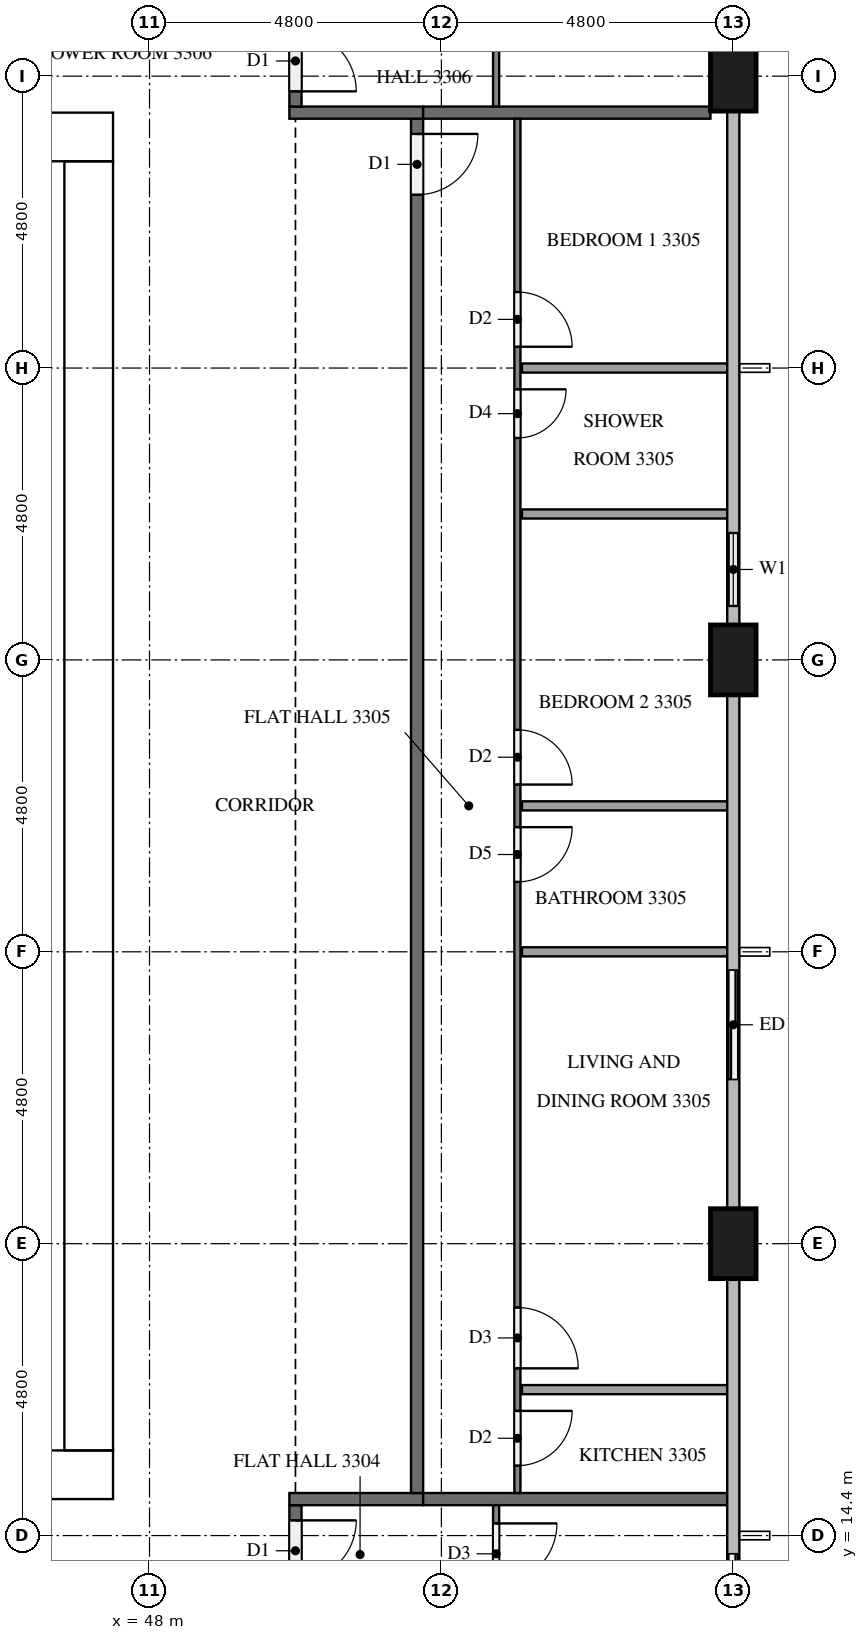
"""IFC4 building model, lengths in metres.
Left out: names, types, materials, properties, quantities, classifications, styles, units other than length and angle.
Written with IfcOpenShell. Run it as: python <this file> out.ifc"""

import sys

from ifc_helpers import new_model, si_unit, direction, frame, frame_2d, origin, origin_2d, place, context, subcontext, project, spatial, rectangle, extrude, element, fill, save


model = new_model("IFC4")
c1 = context("Model", 3, precision=1e-05, world=origin(), true_north=direction((0.0, 1.0)))
c2 = subcontext(c1, "Body", "Model", "MODEL_VIEW")
j1 = project(units=[si_unit("LENGTHUNIT", "METRE"), si_unit("PLANEANGLEUNIT", "RADIAN")], contexts=[c1])
p1 = place(None, origin())
s1 = spatial("IfcSite", under=j1, at=p1, CompositionType="ELEMENT")
p2 = place(p1, origin())
s2 = spatial("IfcBuilding", under=s1, at=p2, CompositionType="ELEMENT")
p3 = place(p2, frame((0.0, 0.0, 129.6)))
s3 = spatial("IfcBuildingStorey", under=s2, at=p3, CompositionType="ELEMENT", Elevation=129.6)
p4 = place(p3, frame((15.0, 15.4, 0.0), z_axis=(0.0, 0.0, 1.0), x_axis=(1.0, 0.0, 0.0)))
e1 = element("IfcWall", 1, at=p4, inside=s3, PredefinedType="SHEAR", context=c2, shape_type="SweptSolid", body=[
    extrude(rectangle(XDim=32.4, YDim=0.8, at=frame_2d((16.2, 0.0))), origin(), (0.0, 0.0, 1.0), 3.2),
])
p5 = place(p4, frame((15.3, 0.0, 0.0)))
e2 = element("IfcOpeningElement", 2, at=p5, cuts=e1, PredefinedType="OPENING", context=c2, shape_type="SweptSolid", body=[
    extrude(rectangle(XDim=1.8, YDim=2.1, at=frame_2d((0.9, 1.05))), frame((0.0, 0.41, 0.0), z_axis=(0.0, -1.0, 0.0), x_axis=(1.0, 0.0, 0.0)), (0.0, 0.0, 1.0), 0.82),
])
p6 = place(p3, frame((15.0, 37.4, 0.0), z_axis=(0.0, 0.0, 1.0), x_axis=(1.0, 0.0, 0.0)))
e3 = element("IfcWall", 3, at=p6, inside=s3, PredefinedType="SHEAR", context=c2, shape_type="SweptSolid", body=[
    extrude(rectangle(XDim=32.4, YDim=0.8, at=frame_2d((16.2, 0.0))), origin(), (0.0, 0.0, 1.0), 3.2),
])
p7 = place(p6, frame((15.3, 0.0, 0.0)))
e4 = element("IfcOpeningElement", 4, at=p7, cuts=e3, PredefinedType="OPENING", context=c2, shape_type="SweptSolid", body=[
    extrude(rectangle(XDim=1.8, YDim=2.1, at=frame_2d((0.9, 1.05))), frame((0.0, 0.41, 0.0), z_axis=(0.0, -1.0, 0.0), x_axis=(1.0, 0.0, 0.0)), (0.0, 0.0, 1.0), 0.82),
])
p8 = place(p6, frame((1.51, 0.0, 0.0)))
e5 = element("IfcOpeningElement", 5, at=p8, cuts=e3, PredefinedType="OPENING", context=c2, shape_type="SweptSolid", body=[
    extrude(rectangle(XDim=1.0, YDim=2.1, at=frame_2d((0.5, 1.05))), frame((0.0, 0.41, 0.0), z_axis=(0.0, -1.0, 0.0), x_axis=(1.0, 0.0, 0.0)), (0.0, 0.0, 1.0), 0.82),
])
p9 = place(p6, frame((5.11, 0.0, 0.0)))
e6 = element("IfcOpeningElement", 6, at=p9, cuts=e3, PredefinedType="OPENING", context=c2, shape_type="SweptSolid", body=[
    extrude(rectangle(XDim=1.0, YDim=2.1, at=frame_2d((0.5, 1.05))), frame((0.0, 0.41, 0.0), z_axis=(0.0, -1.0, 0.0), x_axis=(1.0, 0.0, 0.0)), (0.0, 0.0, 1.0), 0.82),
])
p10 = place(p3, frame((47.0, 15.8, 0.0), z_axis=(0.0, 0.0, 1.0), x_axis=(0.0, 1.0, 0.0)))
e7 = element("IfcWall", 7, at=p10, inside=s3, PredefinedType="SHEAR", context=c2, shape_type="SweptSolid", body=[
    extrude(rectangle(XDim=21.2, YDim=0.8, at=frame_2d((10.6, 0.0))), origin(), (0.0, 0.0, 1.0), 3.2),
])
p11 = place(p10, frame((10.3, 0.0, 0.0)))
e8 = element("IfcOpeningElement", 8, at=p11, cuts=e7, PredefinedType="OPENING", context=c2, shape_type="SweptSolid", body=[
    extrude(rectangle(XDim=1.2, YDim=2.1, at=frame_2d((0.6, 1.05))), frame((0.0, 0.41, 0.0), z_axis=(0.0, -1.0, 0.0), x_axis=(1.0, 0.0, 0.0)), (0.0, 0.0, 1.0), 0.82),
])
for number, where, z_axis, x_axis in (
    (9, (57.6, 19.2, 0.0), (0.0, 0.0, 1.0), (0.0, 1.0, 0.0)),
    (10, (57.6, 28.8, 0.0), (0.0, 0.0, 1.0), (0.0, 1.0, 0.0)),
    (11, (57.6, 38.4, 0.0), (0.0, 0.0, 1.0), (0.0, 1.0, 0.0)),
):
    element("IfcColumn", number, at=place(p3, frame(where, z_axis=z_axis, x_axis=x_axis)), inside=s3, PredefinedType="COLUMN", context=c2, shape_type="SweptSolid", body=[
        extrude(rectangle(XDim=1.15, YDim=0.75, at=origin_2d()), origin(), (0.0, 0.0, 1.0), 3.2),
    ])
p12 = place(p3, frame((57.6, 12.0, 0.0), z_axis=(0.0, 0.0, 1.0), x_axis=(0.0, 1.0, 0.0)))
e12 = element("IfcWall", 12, at=p12, inside=s3, PredefinedType="SOLIDWALL", context=c2, shape_type="SweptSolid", body=[
    extrude(rectangle(XDim=2.4, YDim=0.15, at=frame_2d((1.2, 0.0))), origin(), (0.0, 0.0, 1.0), 3.2),
])
p13 = place(p12, frame((0.3, 0.0, 0.0)))
e13 = element("IfcOpeningElement", 13, at=p13, cuts=e12, PredefinedType="OPENING", context=c2, shape_type="SweptSolid", body=[
    extrude(rectangle(XDim=1.8, YDim=2.4, at=frame_2d((0.9, 1.2))), frame((0.0, 0.085, 0.0), z_axis=(0.0, -1.0, 0.0), x_axis=(1.0, 0.0, 0.0)), (0.0, 0.0, 1.0), 0.17),
])
p14 = place(p3, frame((57.6, 21.6, 0.0), z_axis=(0.0, 0.0, 1.0), x_axis=(0.0, 1.0, 0.0)))
e14 = element("IfcWall", 14, at=p14, inside=s3, PredefinedType="SOLIDWALL", context=c2, shape_type="SweptSolid", body=[
    extrude(rectangle(XDim=2.4, YDim=0.15, at=frame_2d((1.2, 0.0))), origin(), (0.0, 0.0, 1.0), 3.2),
])
p15 = place(p14, frame((0.3, 0.0, 0.0)))
e15 = element("IfcOpeningElement", 15, at=p15, cuts=e14, PredefinedType="OPENING", context=c2, shape_type="SweptSolid", body=[
    extrude(rectangle(XDim=1.8, YDim=2.4, at=frame_2d((0.9, 1.2))), frame((0.0, 0.085, 0.0), z_axis=(0.0, -1.0, 0.0), x_axis=(1.0, 0.0, 0.0)), (0.0, 0.0, 1.0), 0.17),
])
p16 = place(p3, frame((57.6, 29.375, 0.0), z_axis=(0.0, 0.0, 1.0), x_axis=(0.0, 1.0, 0.0)))
e16 = element("IfcWall", 16, at=p16, inside=s3, PredefinedType="SOLIDWALL", context=c2, shape_type="SweptSolid", body=[
    extrude(rectangle(XDim=1.825, YDim=0.15, at=frame_2d((0.913, 0.0))), origin(), (0.0, 0.0, 1.0), 3.2),
])
p17 = place(p16, frame((0.312, 0.0, 0.9)))
e17 = element("IfcOpeningElement", 17, at=p17, cuts=e16, PredefinedType="OPENING", context=c2, shape_type="SweptSolid", body=[
    extrude(rectangle(XDim=1.2, YDim=1.4, at=frame_2d((0.6, 0.7))), frame((0.0, 0.085, 0.0), z_axis=(0.0, -1.0, 0.0), x_axis=(1.0, 0.0, 0.0)), (0.0, 0.0, 1.0), 0.17),
])
p18 = place(p3, frame((50.4, 14.9, 0.0), z_axis=(0.0, 0.0, 1.0), x_axis=(0.0, -1.0, 0.0)))
e18 = element("IfcWall", 18, at=p18, inside=s3, PredefinedType="PARTITIONING", context=c2, shape_type="SweptSolid", body=[
    extrude(rectangle(XDim=2.8, YDim=0.2, at=frame_2d((1.4, 0.0))), origin(), (0.0, 0.0, 1.0), 3.2),
])
p19 = place(p18, frame((0.25, 0.0, 0.0)))
e19 = element("IfcOpeningElement", 19, at=p19, cuts=e18, PredefinedType="OPENING", context=c2, shape_type="SweptSolid", body=[
    extrude(rectangle(XDim=1.0, YDim=2.1, at=frame_2d((0.5, 1.05))), frame((0.0, 0.11, 0.0), z_axis=(0.0, -1.0, 0.0), x_axis=(1.0, 0.0, 0.0)), (0.0, 0.0, 1.0), 0.22),
])
p20 = place(p3, frame((50.3, 15.0, 0.0), z_axis=(0.0, 0.0, 1.0), x_axis=(1.0, 0.0, 0.0)))
e20 = element("IfcWall", 20, at=p20, inside=s3, PredefinedType="PARTITIONING", context=c2, shape_type="SweptSolid", body=[
    extrude(rectangle(XDim=2.2, YDim=0.2, at=frame_2d((1.1, 0.0))), origin(), (0.0, 0.0, 1.0), 3.2),
])
p21 = place(p3, frame((52.4, 37.7, 0.0), z_axis=(0.0, 0.0, 1.0), x_axis=(0.0, -1.0, 0.0)))
e21 = element("IfcWall", 21, at=p21, inside=s3, PredefinedType="PARTITIONING", context=c2, shape_type="SweptSolid", body=[
    extrude(rectangle(XDim=22.6, YDim=0.2, at=frame_2d((11.3, 0.0))), origin(), (0.0, 0.0, 1.0), 3.2),
])
p22 = place(p21, frame((0.25, 0.0, 0.0)))
e22 = element("IfcOpeningElement", 22, at=p22, cuts=e21, PredefinedType="OPENING", context=c2, shape_type="SweptSolid", body=[
    extrude(rectangle(XDim=1.0, YDim=2.1, at=frame_2d((0.5, 1.05))), frame((0.0, 0.11, 0.0), z_axis=(0.0, -1.0, 0.0), x_axis=(1.0, 0.0, 0.0)), (0.0, 0.0, 1.0), 0.22),
])
p23 = place(p3, frame((52.5, 37.8, 0.0), z_axis=(0.0, 0.0, 1.0), x_axis=(-1.0, 0.0, 0.0)))
e23 = element("IfcWall", 23, at=p23, inside=s3, PredefinedType="PARTITIONING", context=c2, shape_type="SweptSolid", body=[
    extrude(rectangle(XDim=2.2, YDim=0.2, at=frame_2d((1.1, 0.0))), origin(), (0.0, 0.0, 1.0), 3.2),
])
p24 = place(p3, frame((50.4, 40.7, 0.0), z_axis=(0.0, 0.0, 1.0), x_axis=(0.0, -1.0, 0.0)))
e24 = element("IfcWall", 24, at=p24, inside=s3, PredefinedType="PARTITIONING", context=c2, shape_type="SweptSolid", body=[
    extrude(rectangle(XDim=2.8, YDim=0.2, at=frame_2d((1.4, 0.0))), origin(), (0.0, 0.0, 1.0), 3.2),
])
p25 = place(p24, frame((1.55, 0.0, 0.0)))
e25 = element("IfcOpeningElement", 25, at=p25, cuts=e24, PredefinedType="OPENING", context=c2, shape_type="SweptSolid", body=[
    extrude(rectangle(XDim=1.0, YDim=2.1, at=frame_2d((0.5, 1.05))), frame((0.0, 0.11, 0.0), z_axis=(0.0, -1.0, 0.0), x_axis=(1.0, 0.0, 0.0)), (0.0, 0.0, 1.0), 0.22),
])
p26 = place(p3, frame((52.5, 15.0, 0.0), z_axis=(0.0, 0.0, 1.0), x_axis=(1.0, 0.0, 0.0)))
e26 = element("IfcWall", 26, at=p26, inside=s3, PredefinedType="PARTITIONING", context=c2, shape_type="SweptSolid", body=[
    extrude(rectangle(XDim=5.0, YDim=0.2, at=frame_2d((2.5, 0.0))), origin(), (0.0, 0.0, 1.0), 3.2),
])
p27 = place(p3, frame((52.5, 37.8, 0.0), z_axis=(0.0, 0.0, 1.0), x_axis=(1.0, 0.0, 0.0)))
e27 = element("IfcWall", 27, at=p27, inside=s3, PredefinedType="PARTITIONING", context=c2, shape_type="SweptSolid", body=[
    extrude(rectangle(XDim=4.725, YDim=0.2, at=frame_2d((2.363, 0.0))), origin(), (0.0, 0.0, 1.0), 3.2),
])
p28 = place(p3, frame((53.7, 14.9, 0.0), z_axis=(0.0, 0.0, 1.0), x_axis=(0.0, -1.0, 0.0)))
e28 = element("IfcWall", 28, at=p28, inside=s3, PredefinedType="PARTITIONING", context=c2, shape_type="SweptSolid", body=[
    extrude(rectangle(XDim=9.759, YDim=0.1, at=frame_2d((4.879, 0.0))), origin(), (0.0, 0.0, 1.0), 3.2),
])
p29 = place(p28, frame((0.3, 0.0, 0.0)))
e29 = element("IfcOpeningElement", 29, at=p29, cuts=e28, PredefinedType="OPENING", context=c2, shape_type="SweptSolid", body=[
    extrude(rectangle(XDim=1.0, YDim=2.1, at=frame_2d((0.5, 1.05))), frame((0.0, 0.06, 0.0), z_axis=(0.0, -1.0, 0.0), x_axis=(1.0, 0.0, 0.0)), (0.0, 0.0, 1.0), 0.12),
])
p30 = place(p28, frame((8.559, 0.0, 0.0)))
e30 = element("IfcOpeningElement", 30, at=p30, cuts=e28, PredefinedType="OPENING", context=c2, shape_type="SweptSolid", body=[
    extrude(rectangle(XDim=0.9, YDim=2.1, at=frame_2d((0.45, 1.05))), frame((0.0, 0.06, 0.0), z_axis=(0.0, -1.0, 0.0), x_axis=(1.0, 0.0, 0.0)), (0.0, 0.0, 1.0), 0.12),
])
for number, where, z_axis, x_axis in (
    (31, (54.125, 33.6, 0.0), (0.0, 0.0, 1.0), (1.0, 0.0, 0.0)),
    (32, (54.125, 31.2, 0.0), (0.0, 0.0, 1.0), (1.0, 0.0, 0.0)),
    (33, (54.125, 26.4, 0.0), (0.0, 0.0, 1.0), (1.0, 0.0, 0.0)),
    (34, (54.125, 24.0, 0.0), (0.0, 0.0, 1.0), (1.0, 0.0, 0.0)),
    (35, (54.125, 16.8, 0.0), (0.0, 0.0, 1.0), (1.0, 0.0, 0.0)),
):
    element("IfcWall", number, at=place(p3, frame(where, z_axis=z_axis, x_axis=x_axis)), inside=s3, PredefinedType="PARTITIONING", context=c2, shape_type="SweptSolid", body=[
        extrude(rectangle(XDim=3.375, YDim=0.15, at=frame_2d((1.688, 0.0))), origin(), (0.0, 0.0, 1.0), 3.2),
    ])
p31 = place(p3, frame((54.05, 37.7, 0.0), z_axis=(0.0, 0.0, 1.0), x_axis=(0.0, -1.0, 0.0)))
e36 = element("IfcWall", 36, at=p31, inside=s3, PredefinedType="PARTITIONING", context=c2, shape_type="SweptSolid", body=[
    extrude(rectangle(XDim=22.6, YDim=0.1, at=frame_2d((11.3, 0.0))), origin(), (0.0, 0.0, 1.0), 3.2),
])
p32 = place(p31, frame((2.85, 0.0, 0.0)))
e37 = element("IfcOpeningElement", 37, at=p32, cuts=e36, PredefinedType="OPENING", context=c2, shape_type="SweptSolid", body=[
    extrude(rectangle(XDim=0.9, YDim=2.1, at=frame_2d((0.45, 1.05))), frame((0.0, 0.06, 0.0), z_axis=(0.0, -1.0, 0.0), x_axis=(1.0, 0.0, 0.0)), (0.0, 0.0, 1.0), 0.12),
])
p33 = place(p31, frame((4.45, 0.0, 0.0)))
e38 = element("IfcOpeningElement", 38, at=p33, cuts=e36, PredefinedType="OPENING", context=c2, shape_type="SweptSolid", body=[
    extrude(rectangle(XDim=0.8, YDim=2.1, at=frame_2d((0.4, 1.05))), frame((0.0, 0.06, 0.0), z_axis=(0.0, -1.0, 0.0), x_axis=(1.0, 0.0, 0.0)), (0.0, 0.0, 1.0), 0.12),
])
p34 = place(p31, frame((10.05, 0.0, 0.0)))
e39 = element("IfcOpeningElement", 39, at=p34, cuts=e36, PredefinedType="OPENING", context=c2, shape_type="SweptSolid", body=[
    extrude(rectangle(XDim=0.9, YDim=2.1, at=frame_2d((0.45, 1.05))), frame((0.0, 0.06, 0.0), z_axis=(0.0, -1.0, 0.0), x_axis=(1.0, 0.0, 0.0)), (0.0, 0.0, 1.0), 0.12),
])
p35 = place(p31, frame((11.65, 0.0, 0.0)))
e40 = element("IfcOpeningElement", 40, at=p35, cuts=e36, PredefinedType="OPENING", context=c2, shape_type="SweptSolid", body=[
    extrude(rectangle(XDim=0.9, YDim=2.1, at=frame_2d((0.45, 1.05))), frame((0.0, 0.06, 0.0), z_axis=(0.0, -1.0, 0.0), x_axis=(1.0, 0.0, 0.0)), (0.0, 0.0, 1.0), 0.12),
])
p36 = place(p31, frame((19.55, 0.0, 0.0)))
e41 = element("IfcOpeningElement", 41, at=p36, cuts=e36, PredefinedType="OPENING", context=c2, shape_type="SweptSolid", body=[
    extrude(rectangle(XDim=1.0, YDim=2.1, at=frame_2d((0.5, 1.05))), frame((0.0, 0.06, 0.0), z_axis=(0.0, -1.0, 0.0), x_axis=(1.0, 0.0, 0.0)), (0.0, 0.0, 1.0), 0.12),
])
p37 = place(p31, frame((21.25, 0.0, 0.0)))
e42 = element("IfcOpeningElement", 42, at=p37, cuts=e36, PredefinedType="OPENING", context=c2, shape_type="SweptSolid", body=[
    extrude(rectangle(XDim=0.9, YDim=2.1, at=frame_2d((0.45, 1.05))), frame((0.0, 0.06, 0.0), z_axis=(0.0, -1.0, 0.0), x_axis=(1.0, 0.0, 0.0)), (0.0, 0.0, 1.0), 0.12),
])
p38 = place(p3, frame((53.7, 52.459, 0.0), z_axis=(0.0, 0.0, 1.0), x_axis=(0.0, -1.0, 0.0)))
e43 = element("IfcWall", 43, at=p38, inside=s3, PredefinedType="PARTITIONING", context=c2, shape_type="SweptSolid", body=[
    extrude(rectangle(XDim=14.559, YDim=0.1, at=frame_2d((7.279, 0.0))), origin(), (0.0, 0.0, 1.0), 3.2),
])
p39 = place(p38, frame((9.609, 0.0, 0.0)))
e44 = element("IfcOpeningElement", 44, at=p39, cuts=e43, PredefinedType="OPENING", context=c2, shape_type="SweptSolid", body=[
    extrude(rectangle(XDim=0.9, YDim=2.1, at=frame_2d((0.45, 1.05))), frame((0.0, 0.06, 0.0), z_axis=(0.0, -1.0, 0.0), x_axis=(1.0, 0.0, 0.0)), (0.0, 0.0, 1.0), 0.12),
])
p40 = place(p38, frame((7.909, 0.0, 0.0)))
e45 = element("IfcOpeningElement", 45, at=p40, cuts=e43, PredefinedType="OPENING", context=c2, shape_type="SweptSolid", body=[
    extrude(rectangle(XDim=1.0, YDim=2.1, at=frame_2d((0.5, 1.05))), frame((0.0, 0.06, 0.0), z_axis=(0.0, -1.0, 0.0), x_axis=(1.0, 0.0, 0.0)), (0.0, 0.0, 1.0), 0.12),
])
p41 = place(p38, frame((0.3, 0.0, 0.0)))
e46 = element("IfcOpeningElement", 46, at=p41, cuts=e43, PredefinedType="OPENING", context=c2, shape_type="SweptSolid", body=[
    extrude(rectangle(XDim=0.9, YDim=2.1, at=frame_2d((0.45, 1.05))), frame((0.0, 0.06, 0.0), z_axis=(0.0, -1.0, 0.0), x_axis=(1.0, 0.0, 0.0)), (0.0, 0.0, 1.0), 0.12),
])
p42 = place(p13, origin())
e47 = element("IfcDoor", 47, at=p42, inside=s3, OperationType="SLIDING_TO_RIGHT", PredefinedType="DOOR", context=c2, shape_type="SweptSolid", body=[
    extrude(rectangle(XDim=1.8, YDim=2.4, at=frame_2d((0.9, 1.2))), frame((0.0, 0.025, 0.0), z_axis=(0.0, -1.0, 0.0), x_axis=(1.0, 0.0, 0.0)), (0.0, 0.0, 1.0), 0.05),
])
fill(e13, e47)
p43 = place(p15, origin())
e48 = element("IfcDoor", 48, at=p43, inside=s3, OperationType="SLIDING_TO_LEFT", PredefinedType="DOOR", context=c2, shape_type="SweptSolid", body=[
    extrude(rectangle(XDim=1.8, YDim=2.4, at=frame_2d((0.9, 1.2))), frame((0.0, 0.025, 0.0), z_axis=(0.0, -1.0, 0.0), x_axis=(1.0, 0.0, 0.0)), (0.0, 0.0, 1.0), 0.05),
])
fill(e15, e48)
p44 = place(p17, origin())
e49 = element("IfcWindow", 49, at=p44, inside=s3, PartitioningType="SINGLE_PANEL", PredefinedType="WINDOW", context=c2, shape_type="SweptSolid", body=[
    extrude(rectangle(XDim=1.2, YDim=1.4, at=frame_2d((0.6, 0.7))), frame((0.0, 0.03, 0.0), z_axis=(0.0, -1.0, 0.0), x_axis=(1.0, 0.0, 0.0)), (0.0, 0.0, 1.0), 0.06),
])
fill(e17, e49)
p45 = place(p11, origin())
e50 = element("IfcDoor", 50, at=p45, inside=s3, OperationType="SINGLE_SWING_LEFT", PredefinedType="DOOR", context=c2, shape_type="SweptSolid", body=[
    extrude(rectangle(XDim=1.2, YDim=2.1, at=frame_2d((0.6, 1.05))), frame((0.0, 0.025, 0.0), z_axis=(0.0, -1.0, 0.0), x_axis=(1.0, 0.0, 0.0)), (0.0, 0.0, 1.0), 0.05),
])
fill(e8, e50)
p46 = place(p19, origin())
e51 = element("IfcDoor", 51, at=p46, inside=s3, OperationType="SINGLE_SWING_LEFT", PredefinedType="DOOR", context=c2, shape_type="SweptSolid", body=[
    extrude(rectangle(XDim=1.0, YDim=2.1, at=frame_2d((0.5, 1.05))), frame((0.0, 0.025, 0.0), z_axis=(0.0, -1.0, 0.0), x_axis=(1.0, 0.0, 0.0)), (0.0, 0.0, 1.0), 0.05),
])
fill(e19, e51)
p47 = place(p22, origin())
e52 = element("IfcDoor", 52, at=p47, inside=s3, OperationType="SINGLE_SWING_LEFT", PredefinedType="DOOR", context=c2, shape_type="SweptSolid", body=[
    extrude(rectangle(XDim=1.0, YDim=2.1, at=frame_2d((0.5, 1.05))), frame((0.0, 0.025, 0.0), z_axis=(0.0, -1.0, 0.0), x_axis=(1.0, 0.0, 0.0)), (0.0, 0.0, 1.0), 0.05),
])
fill(e22, e52)
p48 = place(p25, origin())
e53 = element("IfcDoor", 53, at=p48, inside=s3, OperationType="SINGLE_SWING_RIGHT", PredefinedType="DOOR", context=c2, shape_type="SweptSolid", body=[
    extrude(rectangle(XDim=1.0, YDim=2.1, at=frame_2d((0.5, 1.05))), frame((0.0, 0.025, 0.0), z_axis=(0.0, -1.0, 0.0), x_axis=(1.0, 0.0, 0.0)), (0.0, 0.0, 1.0), 0.05),
])
fill(e25, e53)
p49 = place(p29, origin())
e54 = element("IfcDoor", 54, at=p49, inside=s3, OperationType="SINGLE_SWING_LEFT", PredefinedType="DOOR", context=c2, shape_type="SweptSolid", body=[
    extrude(rectangle(XDim=1.0, YDim=2.1, at=frame_2d((0.5, 1.05))), frame((0.0, 0.025, 0.0), z_axis=(0.0, -1.0, 0.0), x_axis=(1.0, 0.0, 0.0)), (0.0, 0.0, 1.0), 0.05),
])
fill(e29, e54)
p50 = place(p32, origin())
e55 = element("IfcDoor", 55, at=p50, inside=s3, OperationType="SINGLE_SWING_RIGHT", PredefinedType="DOOR", context=c2, shape_type="SweptSolid", body=[
    extrude(rectangle(XDim=0.9, YDim=2.1, at=frame_2d((0.45, 1.05))), frame((0.0, 0.025, 0.0), z_axis=(0.0, -1.0, 0.0), x_axis=(1.0, 0.0, 0.0)), (0.0, 0.0, 1.0), 0.05),
])
fill(e37, e55)
p51 = place(p33, origin())
e56 = element("IfcDoor", 56, at=p51, inside=s3, OperationType="SINGLE_SWING_LEFT", PredefinedType="DOOR", context=c2, shape_type="SweptSolid", body=[
    extrude(rectangle(XDim=0.8, YDim=2.1, at=frame_2d((0.4, 1.05))), frame((0.0, 0.025, 0.0), z_axis=(0.0, -1.0, 0.0), x_axis=(1.0, 0.0, 0.0)), (0.0, 0.0, 1.0), 0.05),
])
fill(e38, e56)
p52 = place(p34, origin())
e57 = element("IfcDoor", 57, at=p52, inside=s3, OperationType="SINGLE_SWING_RIGHT", PredefinedType="DOOR", context=c2, shape_type="SweptSolid", body=[
    extrude(rectangle(XDim=0.9, YDim=2.1, at=frame_2d((0.45, 1.05))), frame((0.0, 0.025, 0.0), z_axis=(0.0, -1.0, 0.0), x_axis=(1.0, 0.0, 0.0)), (0.0, 0.0, 1.0), 0.05),
])
fill(e39, e57)
p53 = place(p35, origin())
e58 = element("IfcDoor", 58, at=p53, inside=s3, OperationType="SINGLE_SWING_LEFT", PredefinedType="DOOR", context=c2, shape_type="SweptSolid", body=[
    extrude(rectangle(XDim=0.9, YDim=2.1, at=frame_2d((0.45, 1.05))), frame((0.0, 0.025, 0.0), z_axis=(0.0, -1.0, 0.0), x_axis=(1.0, 0.0, 0.0)), (0.0, 0.0, 1.0), 0.05),
])
fill(e40, e58)
p54 = place(p36, origin())
e59 = element("IfcDoor", 59, at=p54, inside=s3, OperationType="SINGLE_SWING_RIGHT", PredefinedType="DOOR", context=c2, shape_type="SweptSolid", body=[
    extrude(rectangle(XDim=1.0, YDim=2.1, at=frame_2d((0.5, 1.05))), frame((0.0, 0.025, 0.0), z_axis=(0.0, -1.0, 0.0), x_axis=(1.0, 0.0, 0.0)), (0.0, 0.0, 1.0), 0.05),
])
fill(e41, e59)
p55 = place(p37, origin())
e60 = element("IfcDoor", 60, at=p55, inside=s3, OperationType="SINGLE_SWING_LEFT", PredefinedType="DOOR", context=c2, shape_type="SweptSolid", body=[
    extrude(rectangle(XDim=0.9, YDim=2.1, at=frame_2d((0.45, 1.05))), frame((0.0, 0.025, 0.0), z_axis=(0.0, -1.0, 0.0), x_axis=(1.0, 0.0, 0.0)), (0.0, 0.0, 1.0), 0.05),
])
fill(e42, e60)
save(model, sys.argv[1])
